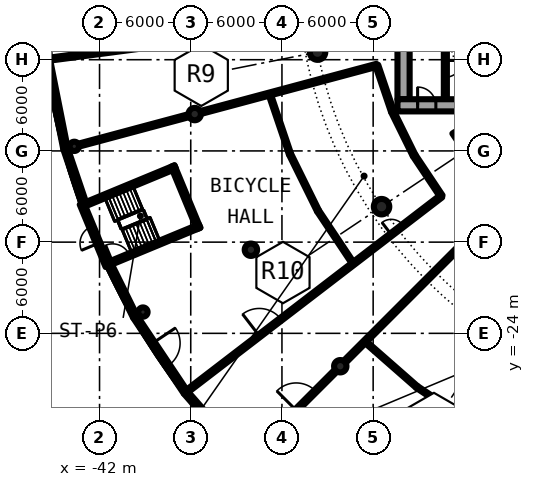
"""IFC4 building model, lengths in metres.
Left out: names, types, materials, properties, quantities, classifications, styles, units other than length and angle.
Written with IfcOpenShell. Run it as: python <this file> out.ifc"""

import sys

from ifc_helpers import new_model, si_unit, direction, frame, frame_2d, origin, origin_2d, place, context, subcontext, project, spatial, rectangle, hollow_circle, extrude, element, fill, save


model = new_model("IFC4")
c1 = context("Model", 3, precision=1e-05, world=origin(), true_north=direction((0.0, 1.0)))
c2 = subcontext(c1, "Body", "Model", "MODEL_VIEW")
j1 = project(units=[si_unit("LENGTHUNIT", "METRE"), si_unit("PLANEANGLEUNIT", "RADIAN")], contexts=[c1])
p1 = place(None, origin())
s1 = spatial("IfcSite", under=j1, at=p1, CompositionType="ELEMENT")
p2 = place(p1, origin())
s2 = spatial("IfcBuilding", under=s1, at=p2, CompositionType="ELEMENT")
p3 = place(p2, origin())
s3 = spatial("IfcBuildingStorey", under=s2, at=p3, CompositionType="ELEMENT", Elevation=0.0)
for number, where, z_axis, x_axis in (
    (1, (-27.658, -5.501, -0.5), (0.0, 0.0, 1.0), (1.0, 0.0, 0.0)),
    (2, (-23.448, -15.667, -0.5), (0.0, 0.0, 1.0), (1.0, 0.0, 0.0)),
):
    element("IfcColumn", number, at=place(p3, frame(where, z_axis=z_axis, x_axis=x_axis)), inside=s3, PredefinedType="COLUMN", context=c2, shape_type="SweptSolid", body=[
        extrude(hollow_circle(Radius=0.508, WallThickness=0.05, at=origin_2d()), origin(), (0.0, 0.0, 1.0), 5.9),
    ])
for number, where, z_axis, x_axis in (
    (3, (-35.739, -9.576, -0.5), (0.0, 0.0, 1.0), (1.0, 0.0, 0.0)),
    (4, (-32.043, -18.5, -0.5), (0.0, 0.0, 1.0), (1.0, 0.0, 0.0)),
    (5, (-26.163, -26.163, -0.5), (0.0, 0.0, 1.0), (1.0, 0.0, 0.0)),
):
    element("IfcColumn", number, at=place(p3, frame(where, z_axis=z_axis, x_axis=x_axis)), inside=s3, PredefinedType="COLUMN", context=c2, shape_type="SweptSolid", body=[
        extrude(hollow_circle(Radius=0.406, WallThickness=0.03, at=origin_2d()), origin(), (0.0, 0.0, 1.0), 5.9),
    ])
for number, where, z_axis, x_axis in (
    (6, (-43.66, -11.698, -0.5), (0.0, 0.0, 1.0), (1.0, 0.0, 0.0)),
    (7, (-39.144, -22.6, -0.5), (0.0, 0.0, 1.0), (1.0, 0.0, 0.0)),
):
    element("IfcColumn", number, at=place(p3, frame(where, z_axis=z_axis, x_axis=x_axis)), inside=s3, PredefinedType="COLUMN", context=c2, shape_type="SweptSolid", body=[
        extrude(hollow_circle(Radius=0.305, WallThickness=0.025, at=origin_2d()), origin(), (0.0, 0.0, 1.0), 5.9),
    ])
p4 = place(p3, frame((-45.408, -5.978, 0.0), z_axis=(0.0, 0.0, 1.0), x_axis=(0.195112945602, -0.980780780021, 0.0)))
e8 = element("IfcWall", 8, at=p4, inside=s3, PredefinedType="SOLIDWALL", context=c2, shape_type="SweptSolid", body=[
    extrude(rectangle(XDim=5.991, YDim=0.3, at=frame_2d((2.996, 0.0))), origin(), (0.0, 0.0, 1.0), 4.95),
])
p5 = place(p4, frame((1.396, 0.0, 0.3)))
e9 = element("IfcOpeningElement", 9, at=p5, cuts=e8, PredefinedType="OPENING", context=c2, shape_type="SweptSolid", body=[
    extrude(rectangle(XDim=3.2, YDim=3.6, at=frame_2d((1.6, 1.8))), frame((0.0, 0.16, 0.0), z_axis=(0.0, -1.0, 0.0), x_axis=(1.0, 0.0, 0.0)), (0.0, 0.0, 1.0), 0.32),
])
p6 = place(p3, frame((-44.239, -11.854, 0.0), z_axis=(0.0, 0.0, 1.0), x_axis=(0.321481387979, -0.946915897629, 0.0)))
e10 = element("IfcWall", 10, at=p6, inside=s3, PredefinedType="SOLIDWALL", context=c2, shape_type="SweptSolid", body=[
    extrude(rectangle(XDim=3.761, YDim=0.3, at=frame_2d((1.88, 0.0))), origin(), (0.0, 0.0, 1.0), 4.95),
])
p7 = place(p3, frame((-41.327, -19.527, 0.0), z_axis=(0.0, 0.0, 1.0), x_axis=(0.44219447383, -0.896919197762, 0.0)))
e11 = element("IfcWall", 11, at=p7, inside=s3, PredefinedType="SOLIDWALL", context=c2, shape_type="SweptSolid", body=[
    extrude(rectangle(XDim=3.76, YDim=0.3, at=frame_2d((1.88, 0.0))), origin(), (0.0, 0.0, 1.0), 4.95),
])
p8 = place(p3, frame((-39.664, -22.9, 0.0), z_axis=(0.0, 0.0, 1.0), x_axis=(0.55554631985, -0.831485590074, 0.0)))
e12 = element("IfcWall", 12, at=p8, inside=s3, PredefinedType="SOLIDWALL", context=c2, shape_type="SweptSolid", body=[
    extrude(rectangle(XDim=5.991, YDim=0.3, at=frame_2d((2.995, 0.0))), origin(), (0.0, 0.0, 1.0), 4.95),
])
p9 = place(p8, frame((2.095, 0.0, 0.0)))
e13 = element("IfcOpeningElement", 13, at=p9, cuts=e12, PredefinedType="OPENING", context=c2, shape_type="SweptSolid", body=[
    extrude(rectangle(XDim=1.8, YDim=2.2, at=frame_2d((0.9, 1.1))), frame((0.0, 0.16, 0.0), z_axis=(0.0, -1.0, 0.0), x_axis=(1.0, 0.0, 0.0)), (0.0, 0.0, 1.0), 0.32),
])
p10 = place(p3, frame((-36.336, -27.881, 0.0), z_axis=(0.0, 0.0, 1.0), x_axis=(0.659450342916, -0.751748126189, 0.0)))
e14 = element("IfcWall", 14, at=p10, inside=s3, PredefinedType="SOLIDWALL", context=c2, shape_type="SweptSolid", body=[
    extrude(rectangle(XDim=5.991, YDim=0.3, at=frame_2d((2.996, 0.0))), origin(), (0.0, 0.0, 1.0), 4.95),
])
p11 = place(p10, frame((1.396, 0.0, 0.3)))
e15 = element("IfcOpeningElement", 15, at=p11, cuts=e14, PredefinedType="OPENING", context=c2, shape_type="SweptSolid", body=[
    extrude(rectangle(XDim=3.2, YDim=3.6, at=frame_2d((1.6, 1.8))), frame((0.0, 0.16, 0.0), z_axis=(0.0, -1.0, 0.0), x_axis=(1.0, 0.0, 0.0)), (0.0, 0.0, 1.0), 0.32),
])
p12 = place(p3, frame((-22.0, -8.6, 0.0), z_axis=(0.0, 0.0, 1.0), x_axis=(0.0, 1.0, 0.0)))
e16 = element("IfcWall", 16, at=p12, inside=s3, PredefinedType="SHEAR", context=c2, shape_type="SweptSolid", body=[
    extrude(rectangle(XDim=17.2, YDim=0.8, at=frame_2d((8.6, 0.0))), origin(), (0.0, 0.0, 1.0), 5.4),
])
p13 = place(p12, frame((7.7, 0.0, 0.0)))
e17 = element("IfcOpeningElement", 17, at=p13, cuts=e16, PredefinedType="OPENING", context=c2, shape_type="SweptSolid", body=[
    extrude(rectangle(XDim=1.8, YDim=2.3, at=frame_2d((0.9, 1.15))), frame((0.0, 0.41, 0.0), z_axis=(0.0, -1.0, 0.0), x_axis=(1.0, 0.0, 0.0)), (0.0, 0.0, 1.0), 0.82),
])
p14 = place(p3, frame((-19.25, -1.575, 0.0), z_axis=(0.0, 0.0, 1.0), x_axis=(0.0, -1.0, 0.0)))
e18 = element("IfcWall", 18, at=p14, inside=s3, PredefinedType="SOLIDWALL", context=c2, shape_type="SweptSolid", body=[
    extrude(rectangle(XDim=7.025, YDim=0.2, at=frame_2d((3.513, 0.0))), origin(), (0.0, 0.0, 1.0), 4.95),
])
p15 = place(p14, frame((4.475, 0.0, 0.0)))
e19 = element("IfcOpeningElement", 19, at=p15, cuts=e18, PredefinedType="OPENING", context=c2, shape_type="SweptSolid", body=[
    extrude(rectangle(XDim=1.1, YDim=2.3, at=frame_2d((0.55, 1.15))), frame((0.0, 0.11, 0.0), z_axis=(0.0, -1.0, 0.0), x_axis=(1.0, 0.0, 0.0)), (0.0, 0.0, 1.0), 0.22),
])
p16 = place(p3, frame((-22.4, -9.0, 0.0), z_axis=(0.0, 0.0, 1.0), x_axis=(1.0, 0.0, 0.0)))
e20 = element("IfcWall", 20, at=p16, inside=s3, PredefinedType="SHEAR", context=c2, shape_type="SweptSolid", body=[
    extrude(rectangle(XDim=5.4, YDim=0.8, at=frame_2d((2.7, 0.0))), origin(), (0.0, 0.0, 1.0), 5.4),
])
p17 = place(p16, frame((1.325, 0.0, 0.0)))
e21 = element("IfcOpeningElement", 21, at=p17, cuts=e20, PredefinedType="OPENING", context=c2, shape_type="SweptSolid", body=[
    extrude(rectangle(XDim=1.2, YDim=2.3, at=frame_2d((0.6, 1.15))), frame((0.0, 0.41, 0.0), z_axis=(0.0, -1.0, 0.0), x_axis=(1.0, 0.0, 0.0)), (0.0, 0.0, 1.0), 0.82),
])
p18 = place(p3, frame((-41.372, -19.41, 0.0), z_axis=(0.0, 0.0, 1.0), x_axis=(0.923886743203, 0.382666023753, 0.0)))
e22 = element("IfcWall", 22, at=p18, inside=s3, PredefinedType="SHEAR", context=c2, shape_type="SweptSolid", body=[
    extrude(rectangle(XDim=6.45, YDim=0.25, at=frame_2d((3.225, 0.0))), origin(), (0.0, 0.0, 1.0), 5.4),
])
p19 = place(p18, frame((0.25, 0.0, 0.0)))
e23 = element("IfcOpeningElement", 23, at=p19, cuts=e22, PredefinedType="OPENING", context=c2, shape_type="SweptSolid", body=[
    extrude(rectangle(XDim=1.2, YDim=2.3, at=frame_2d((0.6, 1.15))), frame((0.0, 0.135, 0.0), z_axis=(0.0, -1.0, 0.0), x_axis=(1.0, 0.0, 0.0)), (0.0, 0.0, 1.0), 0.27),
])
p20 = place(p3, frame((-37.02, -13.061, 0.0), z_axis=(0.0, 0.0, 1.0), x_axis=(-0.923881200375, -0.38267940576, 0.0)))
e24 = element("IfcWall", 24, at=p20, inside=s3, PredefinedType="SHEAR", context=c2, shape_type="SweptSolid", body=[
    extrude(rectangle(XDim=6.45, YDim=0.25, at=frame_2d((3.225, 0.0))), origin(), (0.0, 0.0, 1.0), 5.4),
])
p21 = place(p3, frame((-37.183, -12.993, 0.0), z_axis=(0.0, 0.0, 1.0), x_axis=(0.382713570591, -0.923867048273, 0.0)))
e25 = element("IfcWall", 25, at=p21, inside=s3, PredefinedType="SHEAR", context=c2, shape_type="SweptSolid", body=[
    extrude(rectangle(XDim=4.45, YDim=0.25, at=frame_2d((2.225, 0.0))), origin(), (0.0, 0.0, 1.0), 5.4),
])
p22 = place(p3, frame((-41.462, -19.583, 0.0), z_axis=(0.0, 0.0, 1.0), x_axis=(-0.382666743194, 0.923886445216, 0.0)))
e26 = element("IfcWall", 26, at=p22, inside=s3, PredefinedType="SHEAR", context=c2, shape_type="SweptSolid", body=[
    extrude(rectangle(XDim=4.45, YDim=0.3, at=frame_2d((2.225, 0.0))), origin(), (0.0, 0.0, 1.0), 5.4),
])
p23 = place(p22, frame((1.625, 0.0, 0.0)))
e27 = element("IfcOpeningElement", 27, at=p23, cuts=e26, PredefinedType="OPENING", context=c2, shape_type="SweptSolid", body=[
    extrude(rectangle(XDim=1.2, YDim=2.3, at=frame_2d((0.6, 1.15))), frame((0.0, 0.16, 0.0), z_axis=(0.0, -1.0, 0.0), x_axis=(1.0, 0.0, 0.0)), (0.0, 0.0, 1.0), 0.32),
])
p24 = place(p3, frame((-24.537, -24.537, 0.0), z_axis=(0.0, 0.0, 1.0), x_axis=(0.751976606299, -0.65918979329, 0.0)))
e28 = element("IfcWall", 28, at=p24, inside=s3, PredefinedType="PARTITIONING", context=c2, shape_type="SweptSolid", body=[
    extrude(rectangle(XDim=4.539, YDim=0.15, at=frame_2d((2.27, 0.0))), origin(), (0.0, 0.0, 1.0), 4.95),
])
p25 = place(p3, frame((-21.124, -27.529, 0.0), z_axis=(0.0, 0.0, 1.0), x_axis=(0.831437444522, -0.555618372488, 0.0)))
e29 = element("IfcWall", 29, at=p25, inside=s3, PredefinedType="PARTITIONING", context=c2, shape_type="SweptSolid", body=[
    extrude(rectangle(XDim=4.539, YDim=0.15, at=frame_2d((2.27, 0.0))), origin(), (0.0, 0.0, 1.0), 4.95),
])
p26 = place(p3, frame((-30.813, -8.256, 0.0), z_axis=(0.0, 0.0, 1.0), x_axis=(0.321347869619, -0.9469612171, 0.0)))
e30 = element("IfcWall", 30, at=p26, inside=s3, PredefinedType="PARTITIONING", context=c2, shape_type="SweptSolid", body=[
    extrude(rectangle(XDim=4.173, YDim=0.15, at=frame_2d((2.087, 0.0))), origin(), (0.0, 0.0, 1.0), 4.95),
])
p27 = place(p3, frame((-29.472, -12.208, 0.0), z_axis=(0.0, 0.0, 1.0), x_axis=(0.442409177578, -0.896813313681, 0.0)))
e31 = element("IfcWall", 31, at=p27, inside=s3, PredefinedType="PARTITIONING", context=c2, shape_type="SweptSolid", body=[
    extrude(rectangle(XDim=4.173, YDim=0.15, at=frame_2d((2.086, 0.0))), origin(), (0.0, 0.0, 1.0), 4.95),
])
p28 = place(p3, frame((-27.626, -15.95, 0.0), z_axis=(0.0, 0.0, 1.0), x_axis=(0.555564153908, -0.831473674203, 0.0)))
e32 = element("IfcWall", 32, at=p28, inside=s3, PredefinedType="PARTITIONING", context=c2, shape_type="SweptSolid", body=[
    extrude(rectangle(XDim=4.172, YDim=0.15, at=frame_2d((2.086, 0.0))), origin(), (0.0, 0.0, 1.0), 4.95),
])
p29 = place(p3, frame((-23.762, -6.367, 0.0), z_axis=(0.0, 0.0, 1.0), x_axis=(0.321593976879, -0.946877665823, 0.0)))
e33 = element("IfcWall", 33, at=p29, inside=s3, PredefinedType="PARTITIONING", context=c2, shape_type="SweptSolid", body=[
    extrude(rectangle(XDim=3.218, YDim=0.2, at=frame_2d((1.609, 0.0))), origin(), (0.0, 0.0, 1.0), 4.95),
])
p30 = place(p3, frame((-22.727, -9.414, 0.0), z_axis=(0.0, 0.0, 1.0), x_axis=(0.442259878763, -0.896886949195, 0.0)))
e34 = element("IfcWall", 34, at=p30, inside=s3, PredefinedType="PARTITIONING", context=c2, shape_type="SweptSolid", body=[
    extrude(rectangle(XDim=3.218, YDim=0.2, at=frame_2d((1.609, 0.0))), origin(), (0.0, 0.0, 1.0), 4.95),
])
p31 = place(p3, frame((-21.304, -12.3, 0.0), z_axis=(0.0, 0.0, 1.0), x_axis=(0.555522714148, -0.831501361433, 0.0)))
e35 = element("IfcWall", 35, at=p31, inside=s3, PredefinedType="PARTITIONING", context=c2, shape_type="SweptSolid", body=[
    extrude(rectangle(XDim=3.218, YDim=0.2, at=frame_2d((1.609, 0.0))), origin(), (0.0, 0.0, 1.0), 4.95),
])
p32 = place(p3, frame((-18.706, -10.8, 0.0), z_axis=(0.0, 0.0, 1.0), x_axis=(0.55571678686, -0.831371669473, 0.0)))
e36 = element("IfcWall", 36, at=p32, inside=s3, PredefinedType="PARTITIONING", context=c2, shape_type="SweptSolid", body=[
    extrude(rectangle(XDim=2.825, YDim=0.2, at=frame_2d((1.413, 0.0))), origin(), (0.0, 0.0, 1.0), 4.95),
])
p33 = place(p3, frame((-45.297, -5.963, 0.0), z_axis=(0.0, 0.0, 1.0), x_axis=(0.991454137917, 0.13045571052, 0.0)))
e37 = element("IfcWall", 37, at=p33, inside=s3, PredefinedType="PARTITIONING", context=c2, shape_type="SweptSolid", body=[
    extrude(rectangle(XDim=21.087, YDim=0.2, at=frame_2d((10.544, 0.0))), origin(), (0.0, 0.0, 1.0), 4.95),
])
p34 = place(p33, frame((5.544, 0.0, 0.0)))
e38 = element("IfcOpeningElement", 38, at=p34, cuts=e37, PredefinedType="OPENING", context=c2, shape_type="SweptSolid", body=[
    extrude(rectangle(XDim=0.9, YDim=2.3, at=frame_2d((0.45, 1.15))), frame((0.0, 0.11, 0.0), z_axis=(0.0, -1.0, 0.0), x_axis=(1.0, 0.0, 0.0)), (0.0, 0.0, 1.0), 0.22),
])
p35 = place(p3, frame((-43.37, -11.62, 0.0), z_axis=(0.0, 0.0, 1.0), x_axis=(0.965931198614, 0.25879899448, 0.0)))
e39 = element("IfcWall", 39, at=p35, inside=s3, PredefinedType="PARTITIONING", context=c2, shape_type="SweptSolid", body=[
    extrude(rectangle(XDim=7.501, YDim=0.2, at=frame_2d((3.75, 0.0))), origin(), (0.0, 0.0, 1.0), 4.95),
])
p36 = place(p3, frame((-36.248, -27.811, 0.0), z_axis=(0.0, 0.0, 1.0), x_axis=(0.79344272645, 0.608644920987, 0.0)))
e40 = element("IfcWall", 40, at=p36, inside=s3, PredefinedType="PARTITIONING", context=c2, shape_type="SweptSolid", body=[
    extrude(rectangle(XDim=21.088, YDim=0.2, at=frame_2d((10.544, 0.0))), origin(), (0.0, 0.0, 1.0), 4.95),
])
p37 = place(p36, frame((16.938, 0.0, 0.0)))
e41 = element("IfcOpeningElement", 41, at=p37, cuts=e40, PredefinedType="OPENING", context=c2, shape_type="SweptSolid", body=[
    extrude(rectangle(XDim=1.0, YDim=2.3, at=frame_2d((0.5, 1.15))), frame((0.0, 0.11, 0.0), z_axis=(0.0, -1.0, 0.0), x_axis=(1.0, 0.0, 0.0)), (0.0, 0.0, 1.0), 0.22),
])
p38 = place(p36, frame((5.994, 0.0, 0.0)))
e42 = element("IfcOpeningElement", 42, at=p38, cuts=e40, PredefinedType="OPENING", context=c2, shape_type="SweptSolid", body=[
    extrude(rectangle(XDim=1.8, YDim=2.3, at=frame_2d((0.9, 1.15))), frame((0.0, 0.11, 0.0), z_axis=(0.0, -1.0, 0.0), x_axis=(1.0, 0.0, 0.0)), (0.0, 0.0, 1.0), 0.22),
])
p39 = place(p3, frame((-35.353, -9.472, 0.0), z_axis=(0.0, 0.0, 1.0), x_axis=(0.965943238878, 0.258754051689, 0.0)))
e43 = element("IfcWall", 43, at=p39, inside=s3, PredefinedType="PARTITIONING", context=c2, shape_type="SweptSolid", body=[
    extrude(rectangle(XDim=12.0, YDim=0.2, at=frame_2d((6.0, 0.0))), origin(), (0.0, 0.0, 1.0), 4.95),
])
p40 = place(p3, frame((-31.746, -31.746, 0.0), z_axis=(0.0, 0.0, 1.0), x_axis=(0.707106781187, 0.707106781187, 0.0)))
e44 = element("IfcWall", 44, at=p40, inside=s3, PredefinedType="PARTITIONING", context=c2, shape_type="SweptSolid", body=[
    extrude(rectangle(XDim=7.49, YDim=0.2, at=frame_2d((3.745, 0.0))), origin(), (0.0, 0.0, 1.0), 4.95),
])
p41 = place(p40, frame((3.795, 0.0, 0.0)))
e45 = element("IfcOpeningElement", 45, at=p41, cuts=e44, PredefinedType="OPENING", context=c2, shape_type="SweptSolid", body=[
    extrude(rectangle(XDim=1.8, YDim=2.3, at=frame_2d((0.9, 1.15))), frame((0.0, 0.11, 0.0), z_axis=(0.0, -1.0, 0.0), x_axis=(1.0, 0.0, 0.0)), (0.0, 0.0, 1.0), 0.22),
])
p42 = place(p3, frame((-25.876, -25.876, 0.0), z_axis=(0.0, 0.0, 1.0), x_axis=(0.707106781187, 0.707106781187, 0.0)))
e46 = element("IfcWall", 46, at=p42, inside=s3, PredefinedType="PARTITIONING", context=c2, shape_type="SweptSolid", body=[
    extrude(rectangle(XDim=11.994, YDim=0.2, at=frame_2d((5.997, 0.0))), origin(), (0.0, 0.0, 1.0), 4.95),
])
p43 = place(p5, origin())
e47 = element("IfcWindow", 47, at=p43, inside=s3, PartitioningType="SINGLE_PANEL", PredefinedType="WINDOW", context=c2, shape_type="SweptSolid", body=[
    extrude(rectangle(XDim=3.2, YDim=3.6, at=frame_2d((1.6, 1.8))), frame((0.0, 0.03, 0.0), z_axis=(0.0, -1.0, 0.0), x_axis=(1.0, 0.0, 0.0)), (0.0, 0.0, 1.0), 0.06),
])
fill(e9, e47)
p44 = place(p9, origin())
e48 = element("IfcDoor", 48, at=p44, inside=s3, OperationType="SINGLE_SWING_LEFT", PredefinedType="DOOR", context=c2, shape_type="SweptSolid", body=[
    extrude(rectangle(XDim=1.8, YDim=2.2, at=frame_2d((0.9, 1.1))), frame((0.0, 0.025, 0.0), z_axis=(0.0, -1.0, 0.0), x_axis=(1.0, 0.0, 0.0)), (0.0, 0.0, 1.0), 0.05),
])
fill(e13, e48)
p45 = place(p15, origin())
e49 = element("IfcDoor", 49, at=p45, inside=s3, OperationType="SINGLE_SWING_LEFT", PredefinedType="DOOR", context=c2, shape_type="SweptSolid", body=[
    extrude(rectangle(XDim=1.1, YDim=2.3, at=frame_2d((0.55, 1.15))), frame((0.0, 0.025, 0.0), z_axis=(0.0, -1.0, 0.0), x_axis=(1.0, 0.0, 0.0)), (0.0, 0.0, 1.0), 0.05),
])
fill(e19, e49)
p46 = place(p17, origin())
e50 = element("IfcDoor", 50, at=p46, inside=s3, OperationType="SINGLE_SWING_RIGHT", PredefinedType="DOOR", context=c2, shape_type="SweptSolid", body=[
    extrude(rectangle(XDim=1.2, YDim=2.3, at=frame_2d((0.6, 1.15))), frame((0.0, 0.025, 0.0), z_axis=(0.0, -1.0, 0.0), x_axis=(1.0, 0.0, 0.0)), (0.0, 0.0, 1.0), 0.05),
])
fill(e21, e50)
p47 = place(p19, origin())
e51 = element("IfcDoor", 51, at=p47, inside=s3, OperationType="SINGLE_SWING_RIGHT", PredefinedType="DOOR", context=c2, shape_type="SweptSolid", body=[
    extrude(rectangle(XDim=1.2, YDim=2.3, at=frame_2d((0.6, 1.15))), frame((0.0, 0.025, 0.0), z_axis=(0.0, -1.0, 0.0), x_axis=(1.0, 0.0, 0.0)), (0.0, 0.0, 1.0), 0.05),
])
fill(e23, e51)
p48 = place(p23, origin())
e52 = element("IfcDoor", 52, at=p48, inside=s3, OperationType="SINGLE_SWING_LEFT", PredefinedType="DOOR", context=c2, shape_type="SweptSolid", body=[
    extrude(rectangle(XDim=1.2, YDim=2.3, at=frame_2d((0.6, 1.15))), frame((0.0, 0.025, 0.0), z_axis=(0.0, -1.0, 0.0), x_axis=(1.0, 0.0, 0.0)), (0.0, 0.0, 1.0), 0.05),
])
fill(e27, e52)
p49 = place(p37, origin())
e53 = element("IfcDoor", 53, at=p49, inside=s3, OperationType="SINGLE_SWING_RIGHT", PredefinedType="DOOR", context=c2, shape_type="SweptSolid", body=[
    extrude(rectangle(XDim=1.0, YDim=2.3, at=frame_2d((0.5, 1.15))), frame((0.0, 0.025, 0.0), z_axis=(0.0, -1.0, 0.0), x_axis=(1.0, 0.0, 0.0)), (0.0, 0.0, 1.0), 0.05),
])
fill(e41, e53)
p50 = place(p38, origin())
e54 = element("IfcDoor", 54, at=p50, inside=s3, OperationType="DOUBLE_DOOR_SINGLE_SWING", PredefinedType="DOOR", context=c2, shape_type="SweptSolid", body=[
    extrude(rectangle(XDim=1.8, YDim=2.3, at=frame_2d((0.9, 1.15))), frame((0.0, 0.025, 0.0), z_axis=(0.0, -1.0, 0.0), x_axis=(1.0, 0.0, 0.0)), (0.0, 0.0, 1.0), 0.05),
])
fill(e42, e54)
p51 = place(p41, origin())
e55 = element("IfcDoor", 55, at=p51, inside=s3, OperationType="DOUBLE_DOOR_SINGLE_SWING", PredefinedType="DOOR", context=c2, shape_type="SweptSolid", body=[
    extrude(rectangle(XDim=1.8, YDim=2.3, at=frame_2d((0.9, 1.15))), frame((0.0, 0.025, 0.0), z_axis=(0.0, -1.0, 0.0), x_axis=(1.0, 0.0, 0.0)), (0.0, 0.0, 1.0), 0.05),
])
fill(e45, e55)
save(model, sys.argv[1])
